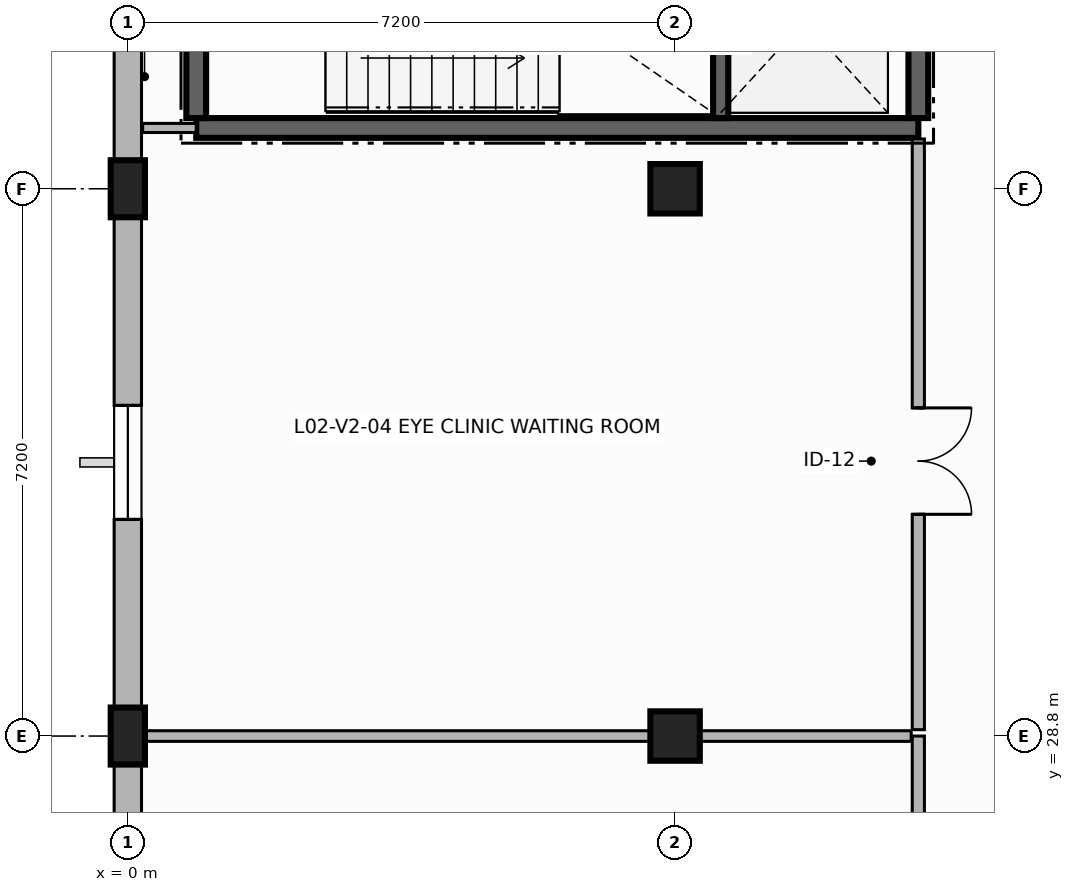
"""IFC4 building model, lengths in metres.
Left out: names, types, materials, properties, quantities, classifications, styles, units other than length and angle.
Written with IfcOpenShell. Run it as: python <this file> out.ifc"""

import sys

from ifc_helpers import new_model, si_unit, direction, frame, frame_2d, origin, origin_2d, place, context, subcontext, project, spatial, rectangle, extrude, element, fill, save


model = new_model("IFC4")
c1 = context("Model", 3, precision=1e-05, world=origin(), true_north=direction((0.0, 1.0)))
c2 = subcontext(c1, "Body", "Model", "MODEL_VIEW")
j1 = project(units=[si_unit("LENGTHUNIT", "METRE"), si_unit("PLANEANGLEUNIT", "RADIAN")], contexts=[c1])
p1 = place(None, origin())
s1 = spatial("IfcSite", under=j1, at=p1, CompositionType="ELEMENT")
p2 = place(p1, origin())
s2 = spatial("IfcBuilding", under=s1, at=p2, CompositionType="ELEMENT")
p3 = place(p2, frame((0.0, 0.0, 8.4)))
s3 = spatial("IfcBuildingStorey", under=s2, at=p3, CompositionType="ELEMENT", Elevation=8.4)
for number, where, z_axis, x_axis in (
    (1, (0.0, 28.8, 0.0), (0.0, 0.0, 1.0), (1.0, 0.0, 0.0)),
    (2, (0.0, 36.0, 0.0), (0.0, 0.0, 1.0), (1.0, 0.0, 0.0)),
):
    element("IfcColumn", number, at=place(p3, frame(where, z_axis=z_axis, x_axis=x_axis)), inside=s3, PredefinedType="PILASTER", context=c2, shape_type="SweptSolid", body=[
        extrude(rectangle(XDim=0.45, YDim=0.75, at=origin_2d()), origin(), (0.0, 0.0, 1.0), 3.62),
    ])
for number, where, z_axis, x_axis in (
    (3, (7.2, 28.8, 0.0), (0.0, 0.0, 1.0), (1.0, 0.0, 0.0)),
    (4, (7.2, 36.0, 0.0), (0.0, 0.0, 1.0), (1.0, 0.0, 0.0)),
):
    element("IfcColumn", number, at=place(p3, frame(where, z_axis=z_axis, x_axis=x_axis)), inside=s3, PredefinedType="COLUMN", context=c2, shape_type="SweptSolid", body=[
        extrude(rectangle(XDim=0.65, YDim=0.65, at=origin_2d()), origin(), (0.0, 0.0, 1.0), 3.62),
    ])
p4 = place(p3, frame((0.0, 43.2, 0.0), z_axis=(0.0, 0.0, 1.0), x_axis=(0.0, -1.0, 0.0)))
e5 = element("IfcWall", 5, at=p4, inside=s3, PredefinedType="SOLIDWALL", context=c2, shape_type="SweptSolid", body=[
    extrude(rectangle(XDim=7.2, YDim=0.36, at=frame_2d((3.6, 0.0))), origin(), (0.0, 0.0, 1.0), 3.0),
])
p5 = place(p4, frame((2.75, 0.0, 0.85)))
e6 = element("IfcOpeningElement", 6, at=p5, cuts=e5, PredefinedType="OPENING", context=c2, shape_type="SweptSolid", body=[
    extrude(rectangle(XDim=1.5, YDim=1.9, at=frame_2d((0.75, 0.95))), frame((0.0, 0.19, 0.0), z_axis=(0.0, -1.0, 0.0), x_axis=(1.0, 0.0, 0.0)), (0.0, 0.0, 1.0), 0.38),
])
p6 = place(p3, frame((0.0, 36.0, 0.0), z_axis=(0.0, 0.0, 1.0), x_axis=(0.0, -1.0, 0.0)))
e7 = element("IfcWall", 7, at=p6, inside=s3, PredefinedType="SOLIDWALL", context=c2, shape_type="SweptSolid", body=[
    extrude(rectangle(XDim=7.2, YDim=0.36, at=frame_2d((3.6, 0.0))), origin(), (0.0, 0.0, 1.0), 3.0),
])
p7 = place(p6, frame((2.85, 0.0, 0.85)))
e8 = element("IfcOpeningElement", 8, at=p7, cuts=e7, PredefinedType="OPENING", context=c2, shape_type="SweptSolid", body=[
    extrude(rectangle(XDim=1.5, YDim=1.9, at=frame_2d((0.75, 0.95))), frame((0.0, 0.19, 0.0), z_axis=(0.0, -1.0, 0.0), x_axis=(1.0, 0.0, 0.0)), (0.0, 0.0, 1.0), 0.38),
])
p8 = place(p3, frame((0.0, 28.8, 0.0), z_axis=(0.0, 0.0, 1.0), x_axis=(0.0, -1.0, 0.0)))
e9 = element("IfcWall", 9, at=p8, inside=s3, PredefinedType="SOLIDWALL", context=c2, shape_type="SweptSolid", body=[
    extrude(rectangle(XDim=7.2, YDim=0.36, at=frame_2d((3.6, 0.0))), origin(), (0.0, 0.0, 1.0), 3.0),
])
p9 = place(p8, frame((2.85, 0.0, 0.85)))
e10 = element("IfcOpeningElement", 10, at=p9, cuts=e9, PredefinedType="OPENING", context=c2, shape_type="SweptSolid", body=[
    extrude(rectangle(XDim=1.5, YDim=1.9, at=frame_2d((0.75, 0.95))), frame((0.0, 0.19, 0.0), z_axis=(0.0, -1.0, 0.0), x_axis=(1.0, 0.0, 0.0)), (0.0, 0.0, 1.0), 0.38),
])
p10 = place(p3, frame((0.9, 36.8, 0.0), z_axis=(0.0, 0.0, 1.0), x_axis=(1.0, 0.0, 0.0)))
e11 = element("IfcWall", 11, at=p10, inside=s3, PredefinedType="SHEAR", context=c2, shape_type="SweptSolid", body=[
    extrude(rectangle(XDim=9.5, YDim=0.26, at=frame_2d((4.75, 0.0))), origin(), (0.0, 0.0, 1.0), 3.62),
])
p11 = place(p3, frame((10.4, 36.93, 0.0), z_axis=(0.0, 0.0, 1.0), x_axis=(0.0, 1.0, 0.0)))
e12 = element("IfcWall", 12, at=p11, inside=s3, PredefinedType="SHEAR", context=c2, shape_type="SweptSolid", body=[
    extrude(rectangle(XDim=5.54, YDim=0.26, at=frame_2d((2.77, 0.0))), origin(), (0.0, 0.0, 1.0), 3.62),
])
p12 = place(p11, frame((4.07, 0.0, 0.0)))
e13 = element("IfcOpeningElement", 13, at=p12, cuts=e12, PredefinedType="OPENING", context=c2, shape_type="SweptSolid", body=[
    extrude(rectangle(XDim=1.15, YDim=2.2, at=frame_2d((0.575, 1.1))), frame((0.0, 0.14, 0.0), z_axis=(0.0, -1.0, 0.0), x_axis=(1.0, 0.0, 0.0)), (0.0, 0.0, 1.0), 0.28),
])
p13 = place(p3, frame((0.9, 42.47, 0.0), z_axis=(0.0, 0.0, 1.0), x_axis=(0.0, -1.0, 0.0)))
e14 = element("IfcWall", 14, at=p13, inside=s3, PredefinedType="SHEAR", context=c2, shape_type="SweptSolid", body=[
    extrude(rectangle(XDim=5.54, YDim=0.26, at=frame_2d((2.77, 0.0))), origin(), (0.0, 0.0, 1.0), 3.62),
])
p14 = place(p3, frame((7.8, 36.93, 0.0), z_axis=(0.0, 0.0, 1.0), x_axis=(0.0, 1.0, 0.0)))
e15 = element("IfcWall", 15, at=p14, inside=s3, PredefinedType="SHEAR", context=c2, shape_type="SweptSolid", body=[
    extrude(rectangle(XDim=3.67, YDim=0.2, at=frame_2d((1.835, 0.0))), origin(), (0.0, 0.0, 1.0), 3.62),
])
p15 = place(p3, frame((10.4, 28.8, 0.0), z_axis=(0.0, 0.0, 1.0), x_axis=(0.0, -1.0, 0.0)))
e16 = element("IfcWall", 16, at=p15, inside=s3, PredefinedType="PARTITIONING", context=c2, shape_type="SweptSolid", body=[
    extrude(rectangle(XDim=7.116, YDim=0.16, at=frame_2d((3.558, 0.0))), origin(), (0.0, 0.0, 1.0), 2.98),
])
p16 = place(p15, frame((3.058, 0.0, 0.0)))
e17 = element("IfcOpeningElement", 17, at=p16, cuts=e16, PredefinedType="OPENING", context=c2, shape_type="SweptSolid", body=[
    extrude(rectangle(XDim=1.0, YDim=2.15, at=frame_2d((0.5, 1.075))), frame((0.0, 0.09, 0.0), z_axis=(0.0, -1.0, 0.0), x_axis=(1.0, 0.0, 0.0)), (0.0, 0.0, 1.0), 0.18),
])
p17 = place(p3, frame((0.195, 28.8, 0.0), z_axis=(0.0, 0.0, 1.0), x_axis=(1.0, 0.0, 0.0)))
e18 = element("IfcWall", 18, at=p17, inside=s3, PredefinedType="PARTITIONING", context=c2, shape_type="SweptSolid", body=[
    extrude(rectangle(XDim=10.111, YDim=0.14, at=frame_2d((5.055, 0.0))), origin(), (0.0, 0.0, 1.0), 2.98),
])
p18 = place(p3, frame((10.4, 36.655, 0.0), z_axis=(0.0, 0.0, 1.0), x_axis=(0.0, -1.0, 0.0)))
e19 = element("IfcWall", 19, at=p18, inside=s3, PredefinedType="PARTITIONING", context=c2, shape_type="SweptSolid", body=[
    extrude(rectangle(XDim=7.771, YDim=0.16, at=frame_2d((3.885, 0.0))), origin(), (0.0, 0.0, 1.0), 2.98),
])
p19 = place(p18, frame((3.538, 0.0, 0.0)))
e20 = element("IfcOpeningElement", 20, at=p19, cuts=e19, PredefinedType="OPENING", context=c2, shape_type="SweptSolid", body=[
    extrude(rectangle(XDim=1.4, YDim=2.3, at=frame_2d((0.7, 1.15))), frame((0.0, 0.09, 0.0), z_axis=(0.0, -1.0, 0.0), x_axis=(1.0, 0.0, 0.0)), (0.0, 0.0, 1.0), 0.18),
])
p20 = place(p3, frame((0.195, 36.8, 0.0), z_axis=(0.0, 0.0, 1.0), x_axis=(1.0, 0.0, 0.0)))
e21 = element("IfcWall", 21, at=p20, inside=s3, PredefinedType="PARTITIONING", context=c2, shape_type="SweptSolid", body=[
    extrude(rectangle(XDim=0.705, YDim=0.12, at=frame_2d((0.353, 0.0))), origin(), (0.0, 0.0, 1.0), 2.98),
])
p21 = place(p7, origin())
e22 = element("IfcWindow", 22, at=p21, inside=s3, PartitioningType="SINGLE_PANEL", PredefinedType="WINDOW", context=c2, shape_type="SweptSolid", body=[
    extrude(rectangle(XDim=1.5, YDim=1.9, at=frame_2d((0.75, 0.95))), frame((0.0, 0.03, 0.0), z_axis=(0.0, -1.0, 0.0), x_axis=(1.0, 0.0, 0.0)), (0.0, 0.0, 1.0), 0.06),
])
fill(e8, e22)
p22 = place(p19, origin())
e23 = element("IfcDoor", 23, at=p22, inside=s3, OperationType="DOUBLE_DOOR_SINGLE_SWING", PredefinedType="DOOR", context=c2, shape_type="SweptSolid", body=[
    extrude(rectangle(XDim=1.4, YDim=2.3, at=frame_2d((0.7, 1.15))), frame((0.0, 0.025, 0.0), z_axis=(0.0, -1.0, 0.0), x_axis=(1.0, 0.0, 0.0)), (0.0, 0.0, 1.0), 0.05),
])
fill(e20, e23)
save(model, sys.argv[1])
